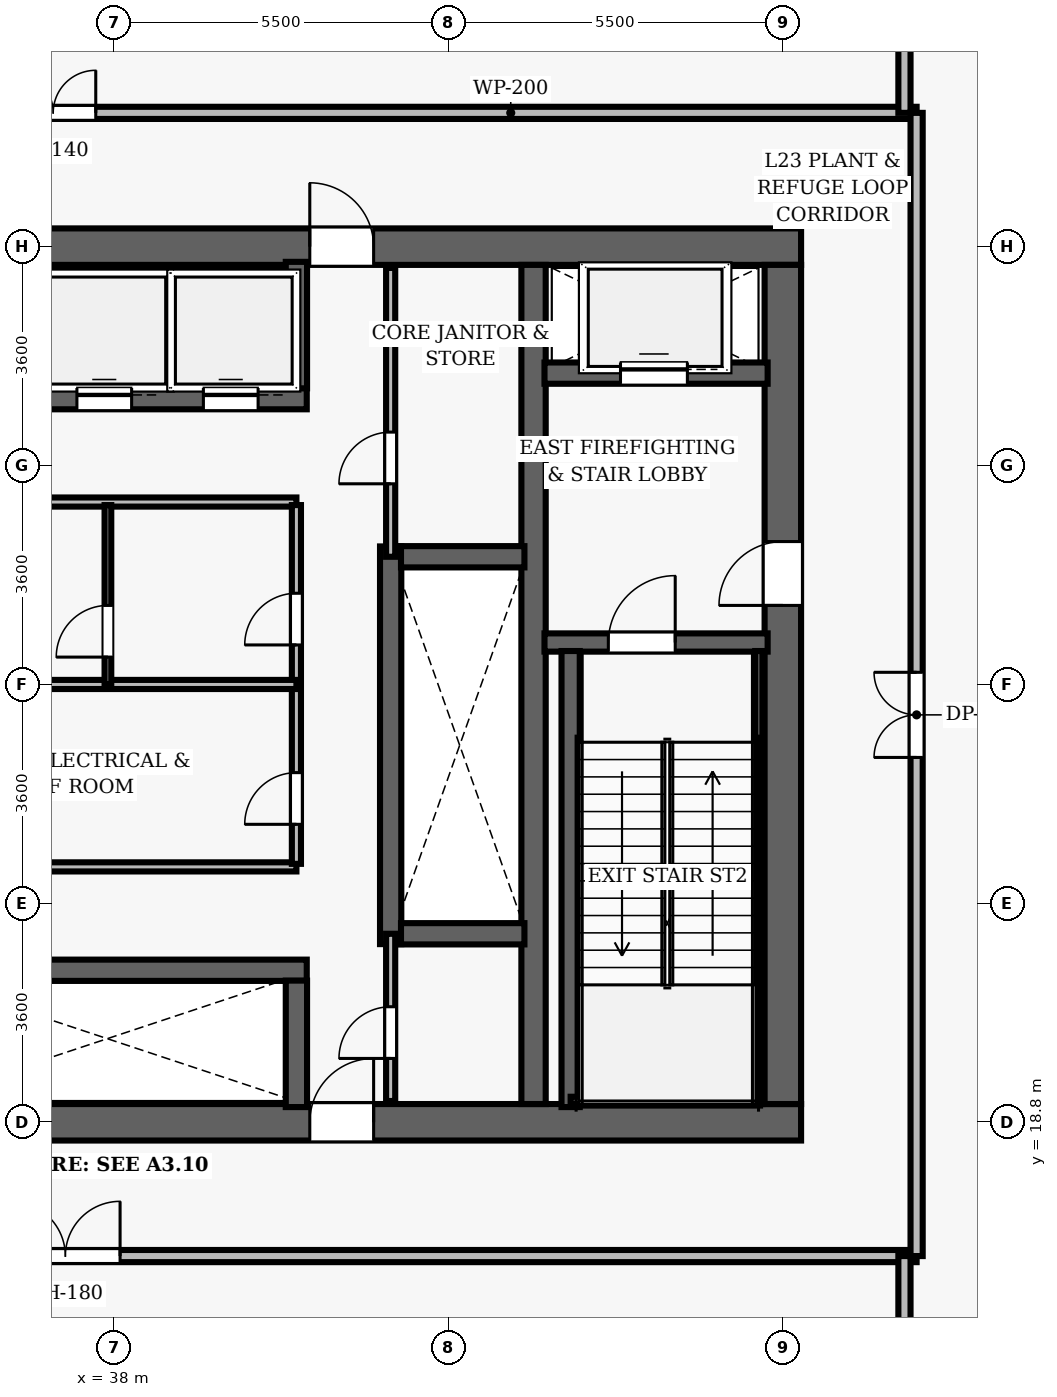
"""IFC4 building model, lengths in metres.
Left out: names, types, materials, properties, quantities, classifications, styles, units other than length and angle.
Written with IfcOpenShell. Run it as: python <this file> out.ifc"""

import sys

from ifc_helpers import new_model, si_unit, direction, frame, frame_2d, origin, place, context, subcontext, project, spatial, rectangle, extrude, element, fill, save


model = new_model("IFC4")
c1 = context("Model", 3, precision=1e-05, world=origin(), true_north=direction((0.0, 1.0)))
c2 = subcontext(c1, "Body", "Model", "MODEL_VIEW")
j1 = project(units=[si_unit("LENGTHUNIT", "METRE"), si_unit("PLANEANGLEUNIT", "RADIAN")], contexts=[c1])
p1 = place(None, origin())
s1 = spatial("IfcSite", under=j1, at=p1, CompositionType="ELEMENT")
p2 = place(p1, origin())
s2 = spatial("IfcBuilding", under=s1, at=p2, CompositionType="ELEMENT")
p3 = place(p2, frame((0.0, 0.0, 97.4)))
s3 = spatial("IfcBuildingStorey", under=s2, at=p3, CompositionType="ELEMENT", Elevation=97.4)
p4 = place(p3, frame((26.7, 18.8, 0.0), z_axis=(0.0, 0.0, 1.0), x_axis=(1.0, 0.0, 0.0)))
e1 = element("IfcWall", 1, at=p4, inside=s3, PredefinedType="SHEAR", context=c2, shape_type="SweptSolid", body=[
    extrude(rectangle(XDim=22.6, YDim=0.6, at=frame_2d((11.3, 0.0))), origin(), (0.0, 0.0, 1.0), 5.4),
])
p5 = place(p4, frame((14.52, 0.0, 0.0)))
e2 = element("IfcOpeningElement", 2, at=p5, cuts=e1, PredefinedType="OPENING", context=c2, shape_type="SweptSolid", body=[
    extrude(rectangle(XDim=1.05, YDim=2.15, at=frame_2d((0.525, 1.075))), frame((0.0, 0.31, 0.0), z_axis=(0.0, -1.0, 0.0), x_axis=(1.0, 0.0, 0.0)), (0.0, 0.0, 1.0), 0.62),
])
p6 = place(p3, frame((26.7, 33.2, 0.0), z_axis=(0.0, 0.0, 1.0), x_axis=(1.0, 0.0, 0.0)))
e3 = element("IfcWall", 3, at=p6, inside=s3, PredefinedType="SHEAR", context=c2, shape_type="SweptSolid", body=[
    extrude(rectangle(XDim=22.6, YDim=0.6, at=frame_2d((11.3, 0.0))), origin(), (0.0, 0.0, 1.0), 5.4),
])
p7 = place(p6, frame((4.62, 0.0, 0.0)))
e4 = element("IfcOpeningElement", 4, at=p7, cuts=e3, PredefinedType="OPENING", context=c2, shape_type="SweptSolid", body=[
    extrude(rectangle(XDim=1.05, YDim=2.15, at=frame_2d((0.525, 1.075))), frame((0.0, 0.31, 0.0), z_axis=(0.0, -1.0, 0.0), x_axis=(1.0, 0.0, 0.0)), (0.0, 0.0, 1.0), 0.62),
])
p8 = place(p6, frame((14.52, 0.0, 0.0)))
e5 = element("IfcOpeningElement", 5, at=p8, cuts=e3, PredefinedType="OPENING", context=c2, shape_type="SweptSolid", body=[
    extrude(rectangle(XDim=1.05, YDim=2.15, at=frame_2d((0.525, 1.075))), frame((0.0, 0.31, 0.0), z_axis=(0.0, -1.0, 0.0), x_axis=(1.0, 0.0, 0.0)), (0.0, 0.0, 1.0), 0.62),
])
p9 = place(p3, frame((49.0, 19.1, 0.0), z_axis=(0.0, 0.0, 1.0), x_axis=(0.0, 1.0, 0.0)))
e6 = element("IfcWall", 6, at=p9, inside=s3, PredefinedType="SHEAR", context=c2, shape_type="SweptSolid", body=[
    extrude(rectangle(XDim=13.8, YDim=0.6, at=frame_2d((6.9, 0.0))), origin(), (0.0, 0.0, 1.0), 5.4),
])
p10 = place(p9, frame((8.2, 0.0, 0.0)))
e7 = element("IfcOpeningElement", 7, at=p10, cuts=e6, PredefinedType="OPENING", context=c2, shape_type="SweptSolid", body=[
    extrude(rectangle(XDim=1.05, YDim=2.15, at=frame_2d((0.525, 1.075))), frame((0.0, 0.31, 0.0), z_axis=(0.0, -1.0, 0.0), x_axis=(1.0, 0.0, 0.0)), (0.0, 0.0, 1.0), 0.62),
])
p11 = place(p3, frame((44.9, 19.1, 0.0), z_axis=(0.0, 0.0, 1.0), x_axis=(0.0, 1.0, 0.0)))
e8 = element("IfcWall", 8, at=p11, inside=s3, PredefinedType="SHEAR", context=c2, shape_type="SweptSolid", body=[
    extrude(rectangle(XDim=13.8, YDim=0.4, at=frame_2d((6.9, 0.0))), origin(), (0.0, 0.0, 1.0), 5.4),
])
p12 = place(p3, frame((45.08, 26.69, 0.0), z_axis=(0.0, 0.0, 1.0), x_axis=(1.0, 0.0, 0.0)))
e9 = element("IfcWall", 9, at=p12, inside=s3, PredefinedType="SHEAR", context=c2, shape_type="SweptSolid", body=[
    extrude(rectangle(XDim=3.67, YDim=0.3, at=frame_2d((1.835, 0.0))), origin(), (0.0, 0.0, 1.0), 5.4),
])
p13 = place(p12, frame((1.05, 0.0, 0.0)))
e10 = element("IfcOpeningElement", 10, at=p13, cuts=e9, PredefinedType="OPENING", context=c2, shape_type="SweptSolid", body=[
    extrude(rectangle(XDim=1.1, YDim=2.15, at=frame_2d((0.55, 1.075))), frame((0.0, 0.16, 0.0), z_axis=(0.0, -1.0, 0.0), x_axis=(1.0, 0.0, 0.0)), (0.0, 0.0, 1.0), 0.32),
])
p14 = place(p3, frame((45.51, 19.05, 0.0), z_axis=(0.0, 0.0, 1.0), x_axis=(0.0, 1.0, 0.0)))
e11 = element("IfcWall", 11, at=p14, inside=s3, PredefinedType="SHEAR", context=c2, shape_type="SweptSolid", body=[
    extrude(rectangle(XDim=7.5, YDim=0.3, at=frame_2d((3.75, 0.0))), origin(), (0.0, 0.0, 1.0), 5.4),
])
p15 = place(p3, frame((48.605, 19.1, 0.0), z_axis=(0.0, 0.0, 1.0), x_axis=(0.0, 1.0, 0.0)))
e12 = element("IfcWall", 12, at=p15, inside=s3, PredefinedType="SHEAR", context=c2, shape_type="SweptSolid", body=[
    extrude(rectangle(XDim=7.45, YDim=0.12, at=frame_2d((3.725, 0.0))), origin(), (0.0, 0.0, 1.0), 5.4),
])
p16 = place(p3, frame((45.51, 19.16, 0.0), z_axis=(0.0, 0.0, 1.0), x_axis=(1.0, 0.0, 0.0)))
e13 = element("IfcWall", 13, at=p16, inside=s3, PredefinedType="SHEAR", context=c2, shape_type="SweptSolid", body=[
    extrude(rectangle(XDim=3.095, YDim=0.12, at=frame_2d((1.547, 0.0))), origin(), (0.0, 0.0, 1.0), 5.4),
])
p17 = place(p3, frame((45.08, 31.12, 0.0), z_axis=(0.0, 0.0, 1.0), x_axis=(1.0, 0.0, 0.0)))
e14 = element("IfcWall", 14, at=p17, inside=s3, PredefinedType="SHEAR", context=c2, shape_type="SweptSolid", body=[
    extrude(rectangle(XDim=3.67, YDim=0.35, at=frame_2d((1.835, 0.0))), origin(), (0.0, 0.0, 1.0), 4.04),
])
p18 = place(p17, frame((1.25, 0.0, 0.0)))
e15 = element("IfcOpeningElement", 15, at=p18, cuts=e14, PredefinedType="OPENING", context=c2, shape_type="SweptSolid", body=[
    extrude(rectangle(XDim=1.1, YDim=2.15, at=frame_2d((0.55, 1.075))), frame((0.0, 0.185, 0.0), z_axis=(0.0, -1.0, 0.0), x_axis=(1.0, 0.0, 0.0)), (0.0, 0.0, 1.0), 0.37),
])
p19 = place(p3, frame((42.55, 21.73, 0.0), z_axis=(0.0, 0.0, 1.0), x_axis=(0.0, 1.0, 0.0)))
e16 = element("IfcWall", 16, at=p19, inside=s3, PredefinedType="SHEAR", context=c2, shape_type="SweptSolid", body=[
    extrude(rectangle(XDim=6.54, YDim=0.35, at=frame_2d((3.27, 0.0))), origin(), (0.0, 0.0, 1.0), 4.04),
])
for number, where, z_axis, x_axis in (
    (17, (42.72, 21.9, 0.0), (0.0, 0.0, 1.0), (1.0, 0.0, 0.0)),
    (18, (42.72, 28.1, 0.0), (0.0, 0.0, 1.0), (1.0, 0.0, 0.0)),
):
    element("IfcWall", number, at=place(p3, frame(where, z_axis=z_axis, x_axis=x_axis)), inside=s3, PredefinedType="SHEAR", context=c2, shape_type="SweptSolid", body=[
        extrude(rectangle(XDim=2.03, YDim=0.35, at=frame_2d((1.015, 0.0))), origin(), (0.0, 0.0, 1.0), 4.04),
    ])
p20 = place(p3, frame((34.81, 30.7, 0.0), z_axis=(0.0, 0.0, 1.0), x_axis=(1.0, 0.0, 0.0)))
e19 = element("IfcWall", 19, at=p20, inside=s3, PredefinedType="SHEAR", context=c2, shape_type="SweptSolid", body=[
    extrude(rectangle(XDim=6.36, YDim=0.35, at=frame_2d((3.18, 0.0))), origin(), (0.0, 0.0, 1.0), 4.04),
])
p21 = place(p20, frame((0.5, 0.0, 0.0)))
e20 = element("IfcOpeningElement", 20, at=p21, cuts=e19, PredefinedType="OPENING", context=c2, shape_type="SweptSolid", body=[
    extrude(rectangle(XDim=0.9, YDim=2.15, at=frame_2d((0.45, 1.075))), frame((0.0, 0.185, 0.0), z_axis=(0.0, -1.0, 0.0), x_axis=(1.0, 0.0, 0.0)), (0.0, 0.0, 1.0), 0.37),
])
p22 = place(p20, frame((2.58, 0.0, 0.0)))
e21 = element("IfcOpeningElement", 21, at=p22, cuts=e19, PredefinedType="OPENING", context=c2, shape_type="SweptSolid", body=[
    extrude(rectangle(XDim=0.9, YDim=2.15, at=frame_2d((0.45, 1.075))), frame((0.0, 0.185, 0.0), z_axis=(0.0, -1.0, 0.0), x_axis=(1.0, 0.0, 0.0)), (0.0, 0.0, 1.0), 0.37),
])
p23 = place(p20, frame((4.66, 0.0, 0.0)))
e22 = element("IfcOpeningElement", 22, at=p23, cuts=e19, PredefinedType="OPENING", context=c2, shape_type="SweptSolid", body=[
    extrude(rectangle(XDim=0.9, YDim=2.15, at=frame_2d((0.45, 1.075))), frame((0.0, 0.185, 0.0), z_axis=(0.0, -1.0, 0.0), x_axis=(1.0, 0.0, 0.0)), (0.0, 0.0, 1.0), 0.37),
])
p24 = place(p3, frame((41.0, 30.87, 0.0), z_axis=(0.0, 0.0, 1.0), x_axis=(0.0, 1.0, 0.0)))
e23 = element("IfcWall", 23, at=p24, inside=s3, PredefinedType="SHEAR", context=c2, shape_type="SweptSolid", body=[
    extrude(rectangle(XDim=2.08, YDim=0.35, at=frame_2d((1.04, 0.0))), origin(), (0.0, 0.0, 1.0), 4.04),
])
p25 = place(p3, frame((34.49, 21.3, 0.0), z_axis=(0.0, 0.0, 1.0), x_axis=(1.0, 0.0, 0.0)))
e24 = element("IfcWall", 24, at=p25, inside=s3, PredefinedType="SHEAR", context=c2, shape_type="SweptSolid", body=[
    extrude(rectangle(XDim=6.68, YDim=0.35, at=frame_2d((3.34, 0.0))), origin(), (0.0, 0.0, 1.0), 4.04),
])
p26 = place(p3, frame((41.0, 19.05, 0.0), z_axis=(0.0, 0.0, 1.0), x_axis=(0.0, 1.0, 0.0)))
e25 = element("IfcWall", 25, at=p26, inside=s3, PredefinedType="SHEAR", context=c2, shape_type="SweptSolid", body=[
    extrude(rectangle(XDim=2.08, YDim=0.35, at=frame_2d((1.04, 0.0))), origin(), (0.0, 0.0, 1.0), 4.04),
])
for number, where, z_axis, x_axis in (
    (26, (34.75, 29.0, 0.0), (0.0, 0.0, 1.0), (1.0, 0.0, 0.0)),
    (27, (34.75, 23.0, 0.0), (0.0, 0.0, 1.0), (1.0, 0.0, 0.0)),
):
    element("IfcWall", number, at=place(p3, frame(where, z_axis=z_axis, x_axis=x_axis)), inside=s3, PredefinedType="PARTITIONING", context=c2, shape_type="SweptSolid", body=[
        extrude(rectangle(XDim=6.25, YDim=0.15, at=frame_2d((3.125, 0.0))), origin(), (0.0, 0.0, 1.0), 4.04),
    ])
p27 = place(p3, frame((41.0, 23.05, 0.0), z_axis=(0.0, 0.0, 1.0), x_axis=(0.0, 1.0, 0.0)))
e28 = element("IfcWall", 28, at=p27, inside=s3, PredefinedType="PARTITIONING", context=c2, shape_type="SweptSolid", body=[
    extrude(rectangle(XDim=5.9, YDim=0.15, at=frame_2d((2.95, 0.0))), origin(), (0.0, 0.0, 1.0), 4.04),
])
p28 = place(p27, frame((0.65, 0.0, 0.0)))
e29 = element("IfcOpeningElement", 29, at=p28, cuts=e28, PredefinedType="OPENING", context=c2, shape_type="SweptSolid", body=[
    extrude(rectangle(XDim=0.85, YDim=2.1, at=frame_2d((0.425, 1.05))), frame((0.0, 0.085, 0.0), z_axis=(0.0, -1.0, 0.0), x_axis=(1.0, 0.0, 0.0)), (0.0, 0.0, 1.0), 0.17),
])
p29 = place(p27, frame((3.6, 0.0, 0.0)))
e30 = element("IfcOpeningElement", 30, at=p29, cuts=e28, PredefinedType="OPENING", context=c2, shape_type="SweptSolid", body=[
    extrude(rectangle(XDim=0.85, YDim=2.1, at=frame_2d((0.425, 1.05))), frame((0.0, 0.085, 0.0), z_axis=(0.0, -1.0, 0.0), x_axis=(1.0, 0.0, 0.0)), (0.0, 0.0, 1.0), 0.17),
])
p30 = place(p3, frame((34.75, 26.0, 0.0), z_axis=(0.0, 0.0, 1.0), x_axis=(1.0, 0.0, 0.0)))
e31 = element("IfcWall", 31, at=p30, inside=s3, PredefinedType="PARTITIONING", context=c2, shape_type="SweptSolid", body=[
    extrude(rectangle(XDim=6.25, YDim=0.15, at=frame_2d((3.125, 0.0))), origin(), (0.0, 0.0, 1.0), 4.04),
])
p31 = place(p3, frame((37.9, 26.0, 0.0), z_axis=(0.0, 0.0, 1.0), x_axis=(0.0, 1.0, 0.0)))
e32 = element("IfcWall", 32, at=p31, inside=s3, PredefinedType="PARTITIONING", context=c2, shape_type="SweptSolid", body=[
    extrude(rectangle(XDim=2.95, YDim=0.11, at=frame_2d((1.475, 0.0))), origin(), (0.0, 0.0, 1.0), 4.04),
])
p32 = place(p31, frame((0.45, 0.0, 0.0)))
e33 = element("IfcOpeningElement", 33, at=p32, cuts=e32, PredefinedType="OPENING", context=c2, shape_type="SweptSolid", body=[
    extrude(rectangle(XDim=0.85, YDim=2.1, at=frame_2d((0.425, 1.05))), frame((0.0, 0.065, 0.0), z_axis=(0.0, -1.0, 0.0), x_axis=(1.0, 0.0, 0.0)), (0.0, 0.0, 1.0), 0.13),
])
p33 = place(p3, frame((42.55, 28.1, 0.0), z_axis=(0.0, 0.0, 1.0), x_axis=(0.0, 1.0, 0.0)))
e34 = element("IfcWall", 34, at=p33, inside=s3, PredefinedType="PARTITIONING", context=c2, shape_type="SweptSolid", body=[
    extrude(rectangle(XDim=4.75, YDim=0.15, at=frame_2d((2.375, 0.0))), origin(), (0.0, 0.0, 1.0), 4.04),
])
p34 = place(p33, frame((1.2, 0.0, 0.0)))
e35 = element("IfcOpeningElement", 35, at=p34, cuts=e34, PredefinedType="OPENING", context=c2, shape_type="SweptSolid", body=[
    extrude(rectangle(XDim=0.85, YDim=2.1, at=frame_2d((0.425, 1.05))), frame((0.0, 0.085, 0.0), z_axis=(0.0, -1.0, 0.0), x_axis=(1.0, 0.0, 0.0)), (0.0, 0.0, 1.0), 0.17),
])
p35 = place(p3, frame((42.55, 19.15, 0.0), z_axis=(0.0, 0.0, 1.0), x_axis=(0.0, 1.0, 0.0)))
e36 = element("IfcWall", 36, at=p35, inside=s3, PredefinedType="PARTITIONING", context=c2, shape_type="SweptSolid", body=[
    extrude(rectangle(XDim=2.75, YDim=0.15, at=frame_2d((1.375, 0.0))), origin(), (0.0, 0.0, 1.0), 4.04),
])
p36 = place(p35, frame((0.7, 0.0, 0.0)))
e37 = element("IfcOpeningElement", 37, at=p36, cuts=e36, PredefinedType="OPENING", context=c2, shape_type="SweptSolid", body=[
    extrude(rectangle(XDim=0.85, YDim=2.1, at=frame_2d((0.425, 1.05))), frame((0.0, 0.085, 0.0), z_axis=(0.0, -1.0, 0.0), x_axis=(1.0, 0.0, 0.0)), (0.0, 0.0, 1.0), 0.17),
])
p37 = place(p3, frame((24.8, 35.4, 0.0), z_axis=(0.0, 0.0, 1.0), x_axis=(1.0, 0.0, 0.0)))
e38 = element("IfcWall", 38, at=p37, inside=s3, PredefinedType="PARTITIONING", context=c2, shape_type="SweptSolid", body=[
    extrude(rectangle(XDim=26.4, YDim=0.2, at=frame_2d((13.2, 0.0))), origin(), (0.0, 0.0, 1.0), 4.04),
])
p38 = place(p37, frame((11.5, 0.0, 0.0)))
e39 = element("IfcOpeningElement", 39, at=p38, cuts=e38, PredefinedType="OPENING", context=c2, shape_type="SweptSolid", body=[
    extrude(rectangle(XDim=1.4, YDim=2.25, at=frame_2d((0.7, 1.125))), frame((0.0, 0.11, 0.0), z_axis=(0.0, -1.0, 0.0), x_axis=(1.0, 0.0, 0.0)), (0.0, 0.0, 1.0), 0.22),
])
p39 = place(p3, frame((24.8, 16.6, 0.0), z_axis=(0.0, 0.0, 1.0), x_axis=(1.0, 0.0, 0.0)))
e40 = element("IfcWall", 40, at=p39, inside=s3, PredefinedType="PARTITIONING", context=c2, shape_type="SweptSolid", body=[
    extrude(rectangle(XDim=26.4, YDim=0.2, at=frame_2d((13.2, 0.0))), origin(), (0.0, 0.0, 1.0), 4.04),
])
p40 = place(p39, frame((11.5, 0.0, 0.0)))
e41 = element("IfcOpeningElement", 41, at=p40, cuts=e40, PredefinedType="OPENING", context=c2, shape_type="SweptSolid", body=[
    extrude(rectangle(XDim=1.8, YDim=2.35, at=frame_2d((0.9, 1.175))), frame((0.0, 0.11, 0.0), z_axis=(0.0, -1.0, 0.0), x_axis=(1.0, 0.0, 0.0)), (0.0, 0.0, 1.0), 0.22),
])
p41 = place(p3, frame((51.2, 16.6, 0.0), z_axis=(0.0, 0.0, 1.0), x_axis=(0.0, 1.0, 0.0)))
e42 = element("IfcWall", 42, at=p41, inside=s3, PredefinedType="PARTITIONING", context=c2, shape_type="SweptSolid", body=[
    extrude(rectangle(XDim=18.8, YDim=0.2, at=frame_2d((9.4, 0.0))), origin(), (0.0, 0.0, 1.0), 4.04),
])
p42 = place(p41, frame((8.2, 0.0, 0.0)))
e43 = element("IfcOpeningElement", 43, at=p42, cuts=e42, PredefinedType="OPENING", context=c2, shape_type="SweptSolid", body=[
    extrude(rectangle(XDim=1.4, YDim=2.25, at=frame_2d((0.7, 1.125))), frame((0.0, 0.11, 0.0), z_axis=(0.0, -1.0, 0.0), x_axis=(1.0, 0.0, 0.0)), (0.0, 0.0, 1.0), 0.22),
])
p43 = place(p3, frame((51.0, 4.654, 0.0), z_axis=(0.0, 0.0, 1.0), x_axis=(0.0, 1.0, 0.0)))
e44 = element("IfcWall", 44, at=p43, inside=s3, PredefinedType="PARTITIONING", context=c2, shape_type="SweptSolid", body=[
    extrude(rectangle(XDim=11.946, YDim=0.2, at=frame_2d((5.973, 0.0))), origin(), (0.0, 0.0, 1.0), 4.04),
])
p44 = place(p3, frame((51.0, 35.4, 0.0), z_axis=(0.0, 0.0, 1.0), x_axis=(0.0, 1.0, 0.0)))
e45 = element("IfcWall", 45, at=p44, inside=s3, PredefinedType="PARTITIONING", context=c2, shape_type="SweptSolid", body=[
    extrude(rectangle(XDim=9.873, YDim=0.2, at=frame_2d((4.937, 0.0))), origin(), (0.0, 0.0, 1.0), 4.04),
])
p45 = place(p13, origin())
e46 = element("IfcDoor", 46, at=p45, inside=s3, OperationType="SINGLE_SWING_RIGHT", PredefinedType="DOOR", context=c2, shape_type="SweptSolid", body=[
    extrude(rectangle(XDim=1.1, YDim=2.15, at=frame_2d((0.55, 1.075))), frame((0.0, 0.025, 0.0), z_axis=(0.0, -1.0, 0.0), x_axis=(1.0, 0.0, 0.0)), (0.0, 0.0, 1.0), 0.05),
])
fill(e10, e46)
p46 = place(p10, origin())
e47 = element("IfcDoor", 47, at=p46, inside=s3, OperationType="SINGLE_SWING_LEFT", PredefinedType="DOOR", context=c2, shape_type="SweptSolid", body=[
    extrude(rectangle(XDim=1.05, YDim=2.15, at=frame_2d((0.525, 1.075))), frame((0.0, 0.025, 0.0), z_axis=(0.0, -1.0, 0.0), x_axis=(1.0, 0.0, 0.0)), (0.0, 0.0, 1.0), 0.05),
])
fill(e7, e47)
p47 = place(p8, origin())
e48 = element("IfcDoor", 48, at=p47, inside=s3, OperationType="SINGLE_SWING_LEFT", PredefinedType="DOOR", context=c2, shape_type="SweptSolid", body=[
    extrude(rectangle(XDim=1.05, YDim=2.15, at=frame_2d((0.525, 1.075))), frame((0.0, 0.025, 0.0), z_axis=(0.0, -1.0, 0.0), x_axis=(1.0, 0.0, 0.0)), (0.0, 0.0, 1.0), 0.05),
])
fill(e5, e48)
p48 = place(p5, origin())
e49 = element("IfcDoor", 49, at=p48, inside=s3, OperationType="SINGLE_SWING_RIGHT", PredefinedType="DOOR", context=c2, shape_type="SweptSolid", body=[
    extrude(rectangle(XDim=1.05, YDim=2.15, at=frame_2d((0.525, 1.075))), frame((0.0, 0.025, 0.0), z_axis=(0.0, -1.0, 0.0), x_axis=(1.0, 0.0, 0.0)), (0.0, 0.0, 1.0), 0.05),
])
fill(e2, e49)
p49 = place(p28, origin())
e50 = element("IfcDoor", 50, at=p49, inside=s3, OperationType="SINGLE_SWING_LEFT", PredefinedType="DOOR", context=c2, shape_type="SweptSolid", body=[
    extrude(rectangle(XDim=0.85, YDim=2.1, at=frame_2d((0.425, 1.05))), frame((0.0, 0.025, 0.0), z_axis=(0.0, -1.0, 0.0), x_axis=(1.0, 0.0, 0.0)), (0.0, 0.0, 1.0), 0.05),
])
fill(e29, e50)
p50 = place(p29, origin())
e51 = element("IfcDoor", 51, at=p50, inside=s3, OperationType="SINGLE_SWING_LEFT", PredefinedType="DOOR", context=c2, shape_type="SweptSolid", body=[
    extrude(rectangle(XDim=0.85, YDim=2.1, at=frame_2d((0.425, 1.05))), frame((0.0, 0.025, 0.0), z_axis=(0.0, -1.0, 0.0), x_axis=(1.0, 0.0, 0.0)), (0.0, 0.0, 1.0), 0.05),
])
fill(e30, e51)
p51 = place(p32, origin())
e52 = element("IfcDoor", 52, at=p51, inside=s3, OperationType="SINGLE_SWING_LEFT", PredefinedType="DOOR", context=c2, shape_type="SweptSolid", body=[
    extrude(rectangle(XDim=0.85, YDim=2.1, at=frame_2d((0.425, 1.05))), frame((0.0, 0.025, 0.0), z_axis=(0.0, -1.0, 0.0), x_axis=(1.0, 0.0, 0.0)), (0.0, 0.0, 1.0), 0.05),
])
fill(e33, e52)
p52 = place(p34, origin())
e53 = element("IfcDoor", 53, at=p52, inside=s3, OperationType="SINGLE_SWING_LEFT", PredefinedType="DOOR", context=c2, shape_type="SweptSolid", body=[
    extrude(rectangle(XDim=0.85, YDim=2.1, at=frame_2d((0.425, 1.05))), frame((0.0, 0.025, 0.0), z_axis=(0.0, -1.0, 0.0), x_axis=(1.0, 0.0, 0.0)), (0.0, 0.0, 1.0), 0.05),
])
fill(e35, e53)
p53 = place(p36, origin())
e54 = element("IfcDoor", 54, at=p53, inside=s3, OperationType="SINGLE_SWING_LEFT", PredefinedType="DOOR", context=c2, shape_type="SweptSolid", body=[
    extrude(rectangle(XDim=0.85, YDim=2.1, at=frame_2d((0.425, 1.05))), frame((0.0, 0.025, 0.0), z_axis=(0.0, -1.0, 0.0), x_axis=(1.0, 0.0, 0.0)), (0.0, 0.0, 1.0), 0.05),
])
fill(e37, e54)
p54 = place(p40, origin())
e55 = element("IfcDoor", 55, at=p54, inside=s3, OperationType="DOUBLE_DOOR_SINGLE_SWING", PredefinedType="DOOR", context=c2, shape_type="SweptSolid", body=[
    extrude(rectangle(XDim=1.8, YDim=2.35, at=frame_2d((0.9, 1.175))), frame((0.0, 0.025, 0.0), z_axis=(0.0, -1.0, 0.0), x_axis=(1.0, 0.0, 0.0)), (0.0, 0.0, 1.0), 0.05),
])
fill(e41, e55)
p55 = place(p38, origin())
e56 = element("IfcDoor", 56, at=p55, inside=s3, OperationType="DOUBLE_DOOR_SINGLE_SWING", PredefinedType="DOOR", context=c2, shape_type="SweptSolid", body=[
    extrude(rectangle(XDim=1.4, YDim=2.25, at=frame_2d((0.7, 1.125))), frame((0.0, 0.025, 0.0), z_axis=(0.0, -1.0, 0.0), x_axis=(1.0, 0.0, 0.0)), (0.0, 0.0, 1.0), 0.05),
])
fill(e39, e56)
p56 = place(p42, origin())
e57 = element("IfcDoor", 57, at=p56, inside=s3, OperationType="DOUBLE_DOOR_SINGLE_SWING", PredefinedType="DOOR", context=c2, shape_type="SweptSolid", body=[
    extrude(rectangle(XDim=1.4, YDim=2.25, at=frame_2d((0.7, 1.125))), frame((0.0, 0.025, 0.0), z_axis=(0.0, -1.0, 0.0), x_axis=(1.0, 0.0, 0.0)), (0.0, 0.0, 1.0), 0.05),
])
fill(e43, e57)
p57 = place(p22, origin())
e58 = element("IfcDoor", 58, at=p57, inside=s3, OperationType="SLIDING_TO_LEFT", PredefinedType="DOOR", context=c2, shape_type="SweptSolid", body=[
    extrude(rectangle(XDim=0.9, YDim=2.15, at=frame_2d((0.45, 1.075))), frame((0.0, 0.025, 0.0), z_axis=(0.0, -1.0, 0.0), x_axis=(1.0, 0.0, 0.0)), (0.0, 0.0, 1.0), 0.05),
])
fill(e21, e58)
p58 = place(p23, origin())
e59 = element("IfcDoor", 59, at=p58, inside=s3, OperationType="SLIDING_TO_LEFT", PredefinedType="DOOR", context=c2, shape_type="SweptSolid", body=[
    extrude(rectangle(XDim=0.9, YDim=2.15, at=frame_2d((0.45, 1.075))), frame((0.0, 0.025, 0.0), z_axis=(0.0, -1.0, 0.0), x_axis=(1.0, 0.0, 0.0)), (0.0, 0.0, 1.0), 0.05),
])
fill(e22, e59)
p59 = place(p18, origin())
e60 = element("IfcDoor", 60, at=p59, inside=s3, OperationType="SLIDING_TO_LEFT", PredefinedType="DOOR", context=c2, shape_type="SweptSolid", body=[
    extrude(rectangle(XDim=1.1, YDim=2.15, at=frame_2d((0.55, 1.075))), frame((0.0, 0.025, 0.0), z_axis=(0.0, -1.0, 0.0), x_axis=(1.0, 0.0, 0.0)), (0.0, 0.0, 1.0), 0.05),
])
fill(e15, e60)
save(model, sys.argv[1])
